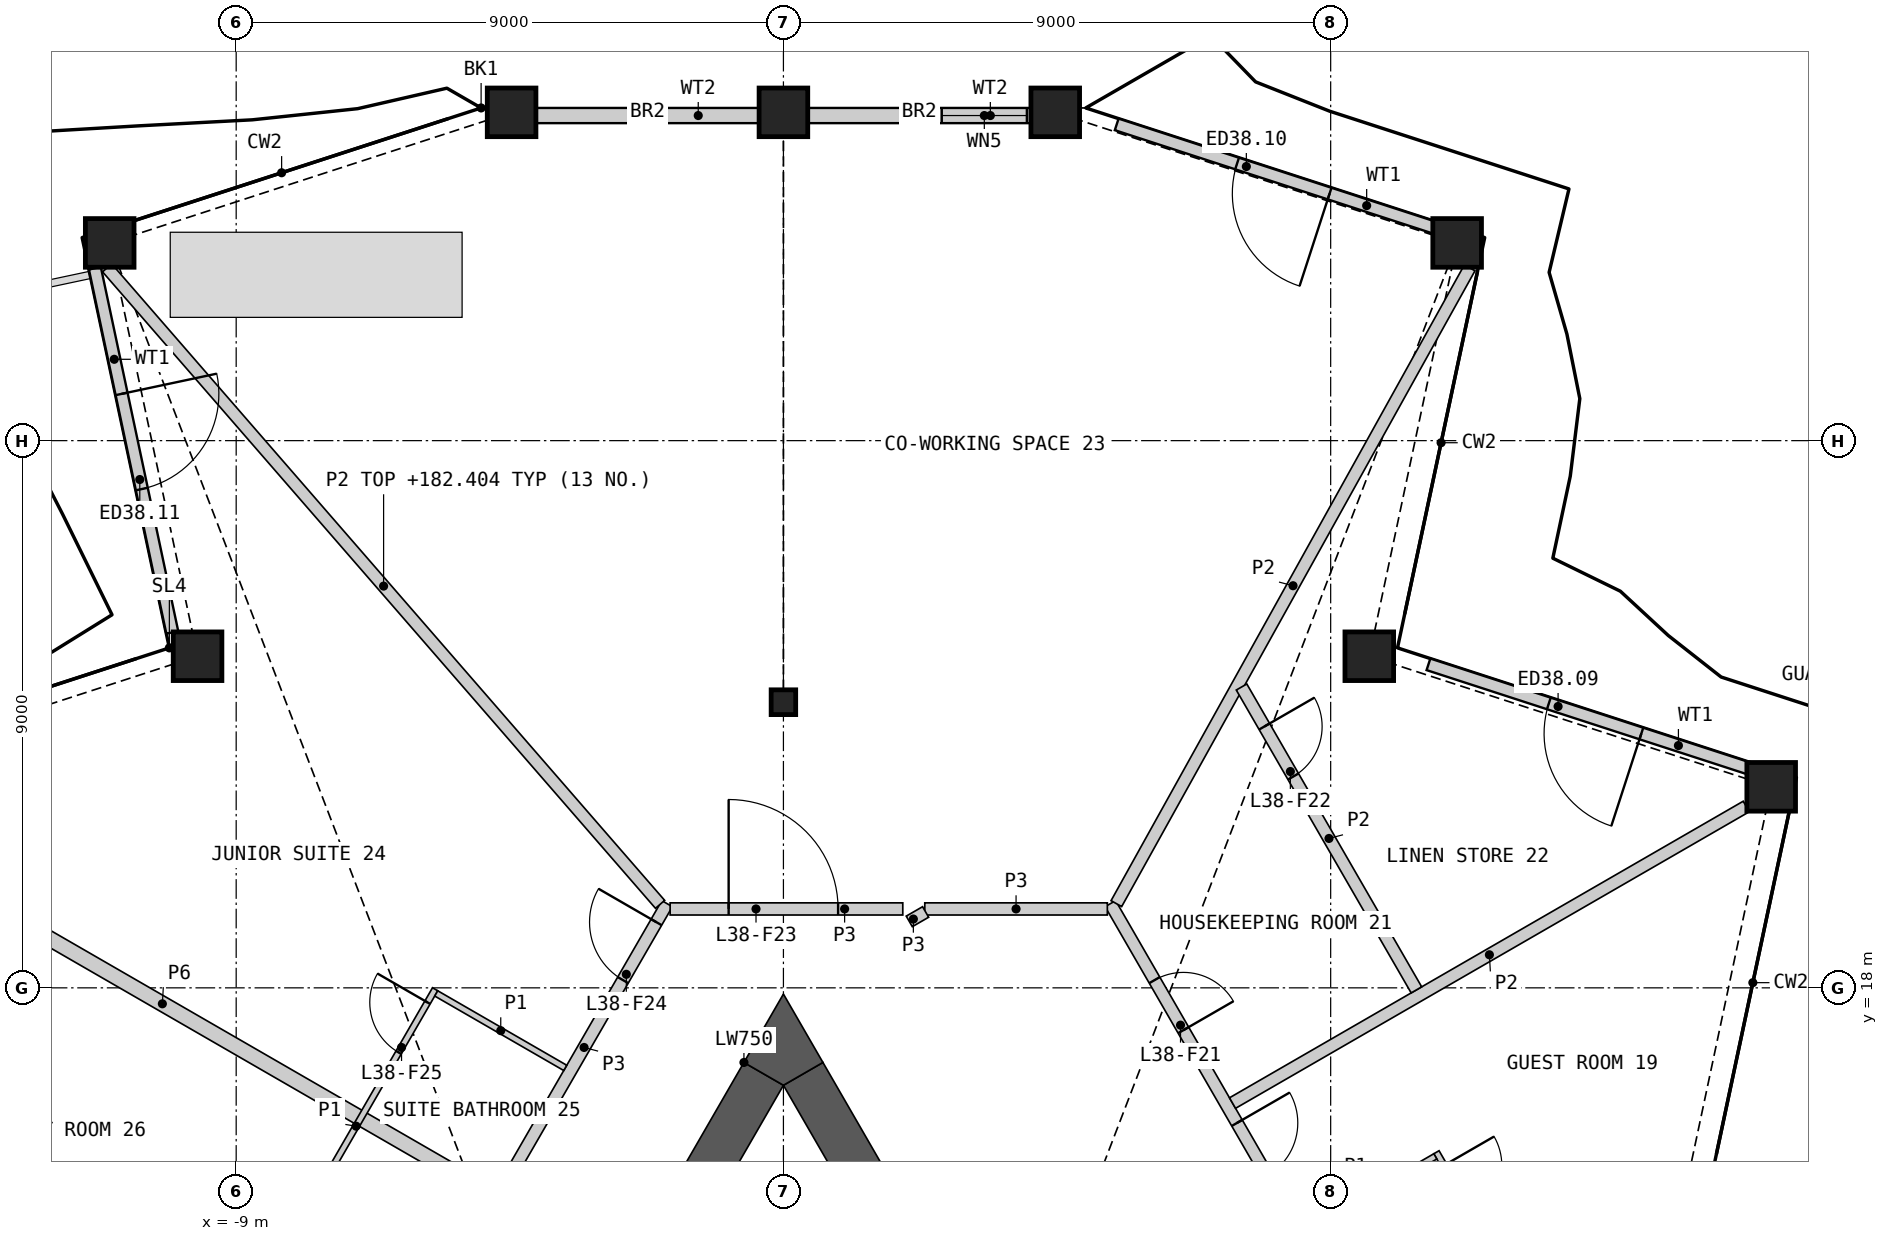
"""IFC4 building model, lengths in metres.
Left out: names, types, materials, properties, quantities, classifications, styles, units other than length and angle.
Written with IfcOpenShell. Run it as: python <this file> out.ifc"""

import sys

from ifc_helpers import new_model, si_unit, direction, frame, frame_2d, origin, origin_2d, place, context, subcontext, project, spatial, polyline, rectangle, hollow_rectangle, i_section, outline, extrude, element, fill, save


model = new_model("IFC4")
c1 = context("Model", 3, precision=1e-05, world=origin(), true_north=direction((0.0, 1.0)))
c2 = subcontext(c1, "Body", "Model", "MODEL_VIEW")
j1 = project(units=[si_unit("LENGTHUNIT", "METRE"), si_unit("PLANEANGLEUNIT", "RADIAN")], contexts=[c1])
p1 = place(None, origin())
s1 = spatial("IfcSite", under=j1, at=p1, CompositionType="ELEMENT")
p2 = place(p1, origin())
s2 = spatial("IfcBuilding", under=s1, at=p2, CompositionType="ELEMENT")
p3 = place(p2, frame((0.0, 0.0, 180.0)))
s3 = spatial("IfcBuildingStorey", under=s2, at=p3, CompositionType="ELEMENT", Elevation=180.0)
for number, where, z_axis, x_axis in (
    (1, (16.245, 21.306, 0.0), (0.0, 0.0, 1.0), (1.0, 0.0, 0.0)),
    (2, (9.635, 23.454, 0.0), (0.0, 0.0, 1.0), (1.0, 0.0, 0.0)),
    (3, (11.08, 30.252, 0.0), (0.0, 0.0, 1.0), (1.0, 0.0, 0.0)),
    (4, (4.47, 32.399, 0.0), (0.0, 0.0, 1.0), (1.0, 0.0, 0.0)),
    (5, (0.0, 32.399, 0.0), (0.0, 0.0, 1.0), (1.0, 0.0, 0.0)),
    (6, (-4.47, 32.399, 0.0), (0.0, 0.0, 1.0), (1.0, 0.0, 0.0)),
    (7, (-11.08, 30.252, 0.0), (0.0, 0.0, 1.0), (1.0, 0.0, 0.0)),
    (8, (-9.635, 23.454, 0.0), (0.0, 0.0, 1.0), (1.0, 0.0, 0.0)),
):
    element("IfcColumn", number, at=place(p3, frame(where, z_axis=z_axis, x_axis=x_axis)), inside=s3, PredefinedType="COLUMN", context=c2, shape_type="SweptSolid", body=[
        extrude(hollow_rectangle(XDim=0.8, YDim=0.8, WallThickness=0.05, at=origin_2d()), origin(), (0.0, 0.0, 1.0), 3.6),
    ])
p4 = place(p3, frame((0.0, 22.698, 0.0), z_axis=(0.0, 0.0, 1.0), x_axis=(1.0, 0.0, 0.0)))
e9 = element("IfcColumn", 9, at=p4, inside=s3, PredefinedType="COLUMN", context=c2, shape_type="SweptSolid", body=[
    extrude(i_section(OverallWidth=0.404, OverallDepth=0.407, WebThickness=0.027, FlangeThickness=0.044, at=origin_2d()), origin(), (0.0, 0.0, 1.0), 3.6),
])
p5 = place(p3, frame((16.089, 21.54, 0.0), z_axis=(0.0, 0.0, 1.0), x_axis=(-0.951053678976, 0.30902572661, 0.0)))
e10 = element("IfcWall", 10, at=p5, inside=s3, PredefinedType="SOLIDWALL", context=c2, shape_type="SweptSolid", body=[
    extrude(rectangle(XDim=5.763, YDim=0.2, at=frame_2d((2.882, 0.0))), origin(), (0.0, 0.0, 1.0), 2.701),
])
p6 = place(p5, frame((2.082, 0.0, 0.0)))
e11 = element("IfcOpeningElement", 11, at=p6, cuts=e10, PredefinedType="OPENING", context=c2, shape_type="SweptSolid", body=[
    extrude(rectangle(XDim=1.6, YDim=2.4, at=frame_2d((0.8, 1.2))), frame((0.0, 0.11, 0.0), z_axis=(0.0, -1.0, 0.0), x_axis=(1.0, 0.0, 0.0)), (0.0, 0.0, 1.0), 0.22),
])
p7 = place(p3, frame((10.962, 30.42, 0.0), z_axis=(0.0, 0.0, 1.0), x_axis=(-0.951062083689, 0.308999859173, 0.0)))
e12 = element("IfcWall", 12, at=p7, inside=s3, PredefinedType="SOLIDWALL", context=c2, shape_type="SweptSolid", body=[
    extrude(rectangle(XDim=5.763, YDim=0.2, at=frame_2d((2.881, 0.0))), origin(), (0.0, 0.0, 1.0), 2.701),
])
p8 = place(p7, frame((2.082, 0.0, 0.0)))
e13 = element("IfcOpeningElement", 13, at=p8, cuts=e12, PredefinedType="OPENING", context=c2, shape_type="SweptSolid", body=[
    extrude(rectangle(XDim=1.6, YDim=2.4, at=frame_2d((0.8, 1.2))), frame((0.0, 0.11, 0.0), z_axis=(0.0, -1.0, 0.0), x_axis=(1.0, 0.0, 0.0)), (0.0, 0.0, 1.0), 0.22),
])
p9 = place(p3, frame((4.404, 32.347, 0.0), z_axis=(0.0, 0.0, 1.0), x_axis=(-1.0, 0.0, 0.0)))
e14 = element("IfcWall", 14, at=p9, inside=s3, PredefinedType="SOLIDWALL", context=c2, shape_type="SweptSolid", body=[
    extrude(rectangle(XDim=4.004, YDim=0.25, at=frame_2d((2.002, 0.0))), origin(), (0.0, 0.0, 1.0), 2.701),
])
p10 = place(p9, frame((0.4, 0.0, 1.6)))
e15 = element("IfcOpeningElement", 15, at=p10, cuts=e14, PredefinedType="OPENING", context=c2, shape_type="SweptSolid", body=[
    extrude(rectangle(XDim=1.4, YDim=0.9, at=frame_2d((0.7, 0.45))), frame((0.0, 0.135, 0.0), z_axis=(0.0, -1.0, 0.0), x_axis=(1.0, 0.0, 0.0)), (0.0, 0.0, 1.0), 0.27),
])
p11 = place(p3, frame((-0.4, 32.347, 0.0), z_axis=(0.0, 0.0, 1.0), x_axis=(-1.0, 0.0, 0.0)))
e16 = element("IfcWall", 16, at=p11, inside=s3, PredefinedType="SOLIDWALL", context=c2, shape_type="SweptSolid", body=[
    extrude(rectangle(XDim=4.004, YDim=0.25, at=frame_2d((2.002, 0.0))), origin(), (0.0, 0.0, 1.0), 2.701),
])
p12 = place(p3, frame((-11.324, 29.835, 0.0), z_axis=(0.0, 0.0, 1.0), x_axis=(0.207925037413, -0.978144763732, 0.0)))
e17 = element("IfcWall", 17, at=p12, inside=s3, PredefinedType="SOLIDWALL", context=c2, shape_type="SweptSolid", body=[
    extrude(rectangle(XDim=6.123, YDim=0.2, at=frame_2d((3.062, 0.0))), origin(), (0.0, 0.0, 1.0), 2.701),
])
p13 = place(p12, frame((2.113, 0.0, 0.0)))
e18 = element("IfcOpeningElement", 18, at=p13, cuts=e17, PredefinedType="OPENING", context=c2, shape_type="SweptSolid", body=[
    extrude(rectangle(XDim=1.6, YDim=2.4, at=frame_2d((0.8, 1.2))), frame((0.0, 0.11, 0.0), z_axis=(0.0, -1.0, 0.0), x_axis=(1.0, 0.0, 0.0)), (0.0, 0.0, 1.0), 0.22),
])
p14 = place(p3, frame((3.661, 10.806, 0.0), z_axis=(0.0, 0.0, 1.0), x_axis=(-0.500014865866, 0.866016820803, 0.0)))
e19 = element("IfcWall", 19, at=p14, inside=s3, PredefinedType="SHEAR", context=c2, shape_type="SweptSolid", body=[
    extrude(rectangle(XDim=6.673, YDim=0.75, at=frame_2d((3.336, 0.0))), origin(), (0.0, 0.0, 1.0), 3.25),
])
p15 = place(p3, frame((-0.325, 16.585, 0.0), z_axis=(0.0, 0.0, 1.0), x_axis=(-0.500019473932, -0.866014160212, 0.0)))
e20 = element("IfcWall", 20, at=p15, inside=s3, PredefinedType="SHEAR", context=c2, shape_type="SweptSolid", body=[
    extrude(rectangle(XDim=2.396, YDim=0.75, at=frame_2d((1.198, 0.0))), origin(), (0.0, 0.0, 1.0), 3.25),
])
p16 = place(p3, origin())
e21 = element("IfcWall", 21, at=p16, inside=s3, PredefinedType="SHEAR", context=c2, shape_type="SweptSolid", body=[
    extrude(outline(polyline([(-0.649, 16.773), (0.0, 17.898), (0.649, 16.773), (0.0, 16.398), (-0.649, 16.773)])), origin(), (0.0, 0.0, 1.0), 3.25),
])
p17 = place(p3, frame((5.377, 19.385, 0.0), z_axis=(0.0, 0.0, 1.0), x_axis=(0.500000757641, -0.86602496636, 0.0)))
e22 = element("IfcWall", 22, at=p17, inside=s3, PredefinedType="PARTITIONING", context=c2, shape_type="SweptSolid", body=[
    extrude(rectangle(XDim=28.198, YDim=0.2, at=frame_2d((14.099, 0.0))), origin(), (0.0, 0.0, 1.0), 3.25),
])
p18 = place(p17, frame((22.735, 0.0, 0.0)))
e23 = element("IfcOpeningElement", 23, at=p18, cuts=e22, PredefinedType="OPENING", context=c2, shape_type="SweptSolid", body=[
    extrude(rectangle(XDim=1.8, YDim=2.1, at=frame_2d((0.9, 1.05))), frame((0.0, 0.11, 0.0), z_axis=(0.0, -1.0, 0.0), x_axis=(1.0, 0.0, 0.0)), (0.0, 0.0, 1.0), 0.22),
])
p19 = place(p17, frame((14.402, 0.0, 0.0)))
e24 = element("IfcOpeningElement", 24, at=p19, cuts=e22, PredefinedType="OPENING", context=c2, shape_type="SweptSolid", body=[
    extrude(rectangle(XDim=1.0, YDim=2.1, at=frame_2d((0.5, 1.05))), frame((0.0, 0.11, 0.0), z_axis=(0.0, -1.0, 0.0), x_axis=(1.0, 0.0, 0.0)), (0.0, 0.0, 1.0), 0.22),
])
p20 = place(p17, frame((12.796, 0.0, 0.0)))
e25 = element("IfcOpeningElement", 25, at=p20, cuts=e22, PredefinedType="OPENING", context=c2, shape_type="SweptSolid", body=[
    extrude(rectangle(XDim=1.0, YDim=2.1, at=frame_2d((0.5, 1.05))), frame((0.0, 0.11, 0.0), z_axis=(0.0, -1.0, 0.0), x_axis=(1.0, 0.0, 0.0)), (0.0, 0.0, 1.0), 0.22),
])
p21 = place(p17, frame((4.164, 0.0, 0.0)))
e26 = element("IfcOpeningElement", 26, at=p21, cuts=e22, PredefinedType="OPENING", context=c2, shape_type="SweptSolid", body=[
    extrude(rectangle(XDim=1.0, YDim=2.1, at=frame_2d((0.5, 1.05))), frame((0.0, 0.11, 0.0), z_axis=(0.0, -1.0, 0.0), x_axis=(1.0, 0.0, 0.0)), (0.0, 0.0, 1.0), 0.22),
])
p22 = place(p17, frame((1.452, 0.0, 0.0)))
e27 = element("IfcOpeningElement", 27, at=p22, cuts=e22, PredefinedType="OPENING", context=c2, shape_type="SweptSolid", body=[
    extrude(rectangle(XDim=0.95, YDim=2.1, at=frame_2d((0.475, 1.05))), frame((0.0, 0.11, 0.0), z_axis=(0.0, -1.0, 0.0), x_axis=(1.0, 0.0, 0.0)), (0.0, 0.0, 1.0), 0.22),
])
p23 = place(p3, frame((-15.835, 20.983, 0.0), z_axis=(0.0, 0.0, 1.0), x_axis=(0.866022720283, -0.500004647933, 0.0)))
e28 = element("IfcWall", 28, at=p23, inside=s3, PredefinedType="PARTITIONING", context=c2, shape_type="SweptSolid", body=[
    extrude(rectangle(XDim=12.981, YDim=0.25, at=frame_2d((6.49, 0.0))), origin(), (0.0, 0.0, 1.0), 2.404),
])
p24 = place(p3, frame((-4.644, 14.655, 0.0), z_axis=(0.0, 0.0, 1.0), x_axis=(0.49998041698, 0.866036709751, 0.0)))
e29 = element("IfcWall", 29, at=p24, inside=s3, PredefinedType="PARTITIONING", context=c2, shape_type="SweptSolid", body=[
    extrude(rectangle(XDim=5.462, YDim=0.2, at=frame_2d((2.731, 0.0))), origin(), (0.0, 0.0, 1.0), 3.25),
])
p25 = place(p24, frame((4.01, 0.0, 0.0)))
e30 = element("IfcOpeningElement", 30, at=p25, cuts=e29, PredefinedType="OPENING", context=c2, shape_type="SweptSolid", body=[
    extrude(rectangle(XDim=1.1, YDim=2.1, at=frame_2d((0.55, 1.05))), frame((0.0, 0.11, 0.0), z_axis=(0.0, -1.0, 0.0), x_axis=(1.0, 0.0, 0.0)), (0.0, 0.0, 1.0), 0.22),
])
p26 = place(p3, frame((-1.863, 19.298, 0.0), z_axis=(0.0, 0.0, 1.0), x_axis=(1.0, 0.0, 0.0)))
e31 = element("IfcWall", 31, at=p26, inside=s3, PredefinedType="PARTITIONING", context=c2, shape_type="SweptSolid", body=[
    extrude(rectangle(XDim=3.826, YDim=0.2, at=frame_2d((1.913, 0.0))), origin(), (0.0, 0.0, 1.0), 3.25),
])
p27 = place(p26, frame((0.962, 0.0, 0.0)))
e32 = element("IfcOpeningElement", 32, at=p27, cuts=e31, PredefinedType="OPENING", context=c2, shape_type="SweptSolid", body=[
    extrude(rectangle(XDim=1.8, YDim=2.1, at=frame_2d((0.9, 1.05))), frame((0.0, 0.11, 0.0), z_axis=(0.0, -1.0, 0.0), x_axis=(1.0, 0.0, 0.0)), (0.0, 0.0, 1.0), 0.22),
])
p28 = place(p3, frame((2.325, 19.298, 0.0), z_axis=(0.0, 0.0, 1.0), x_axis=(1.0, 0.0, 0.0)))
e33 = element("IfcWall", 33, at=p28, inside=s3, PredefinedType="PARTITIONING", context=c2, shape_type="SweptSolid", body=[
    extrude(rectangle(XDim=3.002, YDim=0.2, at=frame_2d((1.501, 0.0))), origin(), (0.0, 0.0, 1.0), 3.25),
])
p29 = place(p3, frame((2.07, 19.093, 0.0), z_axis=(0.0, 0.0, 1.0), x_axis=(0.866395311824, 0.499358752451, 0.0)))
e34 = element("IfcWall", 34, at=p29, inside=s3, PredefinedType="PARTITIONING", context=c2, shape_type="SweptSolid", body=[
    extrude(rectangle(XDim=0.31, YDim=0.2, at=frame_2d((0.155, 0.0))), origin(), (0.0, 0.0, 1.0), 3.25),
])
p30 = place(p3, frame((-11.122, 29.842, 0.0), z_axis=(0.0, 0.0, 1.0), x_axis=(0.65579678992, -0.754937461205, 0.0)))
e35 = element("IfcWall", 35, at=p30, inside=s3, PredefinedType="PARTITIONING", context=c2, shape_type="SweptSolid", body=[
    extrude(rectangle(XDim=13.867, YDim=0.2, at=frame_2d((6.933, 0.0))), origin(), (0.0, 0.0, 1.0), 2.404),
])
p31 = place(p3, frame((5.476, 19.385, 0.0), z_axis=(0.0, 0.0, 1.0), x_axis=(0.485729569949, 0.874109137853, 0.0)))
e36 = element("IfcWall", 36, at=p31, inside=s3, PredefinedType="PARTITIONING", context=c2, shape_type="SweptSolid", body=[
    extrude(rectangle(XDim=11.962, YDim=0.2, at=frame_2d((5.981, 0.0))), origin(), (0.0, 0.0, 1.0), 2.404),
])
p32 = place(p3, frame((7.386, 16.105, 0.0), z_axis=(0.0, 0.0, 1.0), x_axis=(0.866023056814, 0.500004065051, 0.0)))
e37 = element("IfcWall", 37, at=p32, inside=s3, PredefinedType="PARTITIONING", context=c2, shape_type="SweptSolid", body=[
    extrude(rectangle(XDim=9.756, YDim=0.2, at=frame_2d((4.878, 0.0))), origin(), (0.0, 0.0, 1.0), 2.404),
])
p33 = place(p3, frame((7.534, 22.948, 0.0), z_axis=(0.0, 0.0, 1.0), x_axis=(0.499991885958, -0.866030088378, 0.0)))
e38 = element("IfcWall", 38, at=p33, inside=s3, PredefinedType="PARTITIONING", context=c2, shape_type="SweptSolid", body=[
    extrude(rectangle(XDim=5.752, YDim=0.2, at=frame_2d((2.876, 0.0))), origin(), (0.0, 0.0, 1.0), 2.404),
])
p34 = place(p33, frame((0.75, 0.0, 0.0)))
e39 = element("IfcOpeningElement", 39, at=p34, cuts=e38, PredefinedType="OPENING", context=c2, shape_type="SweptSolid", body=[
    extrude(rectangle(XDim=0.95, YDim=2.1, at=frame_2d((0.475, 1.05))), frame((0.0, 0.11, 0.0), z_axis=(0.0, -1.0, 0.0), x_axis=(1.0, 0.0, 0.0)), (0.0, 0.0, 1.0), 0.22),
])
p35 = place(p3, frame((10.74, 15.296, 0.0), z_axis=(0.0, 0.0, 1.0), x_axis=(0.500015767406, -0.866016300277, 0.0)))
e40 = element("IfcWall", 40, at=p35, inside=s3, PredefinedType="PARTITIONING", context=c2, shape_type="SweptSolid", body=[
    extrude(rectangle(XDim=5.5, YDim=0.1, at=frame_2d((2.75, 0.0))), origin(), (0.0, 0.0, 1.0), 2.404),
])
p36 = place(p35, frame((4.3, 0.0, 0.0)))
e41 = element("IfcOpeningElement", 41, at=p36, cuts=e40, PredefinedType="OPENING", context=c2, shape_type="SweptSolid", body=[
    extrude(rectangle(XDim=0.95, YDim=2.1, at=frame_2d((0.475, 1.05))), frame((0.0, 0.06, 0.0), z_axis=(0.0, -1.0, 0.0), x_axis=(1.0, 0.0, 0.0)), (0.0, 0.0, 1.0), 0.12),
])
p37 = place(p35, frame((0.25, 0.0, 0.0)))
e42 = element("IfcOpeningElement", 42, at=p37, cuts=e40, PredefinedType="OPENING", context=c2, shape_type="SweptSolid", body=[
    extrude(rectangle(XDim=0.95, YDim=2.1, at=frame_2d((0.475, 1.05))), frame((0.0, 0.06, 0.0), z_axis=(0.0, -1.0, 0.0), x_axis=(1.0, 0.0, 0.0)), (0.0, 0.0, 1.0), 0.12),
])
p38 = place(p3, frame((-8.328, 13.473, 0.0), z_axis=(0.0, 0.0, 1.0), x_axis=(0.499992051641, 0.866029992723, 0.0)))
e43 = element("IfcWall", 43, at=p38, inside=s3, PredefinedType="PARTITIONING", context=c2, shape_type="SweptSolid", body=[
    extrude(rectangle(XDim=5.2, YDim=0.1, at=frame_2d((2.6, 0.0))), origin(), (0.0, 0.0, 1.0), 2.404),
])
p39 = place(p38, frame((4.0, 0.0, 0.0)))
e44 = element("IfcOpeningElement", 44, at=p39, cuts=e43, PredefinedType="OPENING", context=c2, shape_type="SweptSolid", body=[
    extrude(rectangle(XDim=0.95, YDim=2.1, at=frame_2d((0.475, 1.05))), frame((0.0, 0.06, 0.0), z_axis=(0.0, -1.0, 0.0), x_axis=(1.0, 0.0, 0.0)), (0.0, 0.0, 1.0), 0.12),
])
p40 = place(p38, frame((0.25, 0.0, 0.0)))
e45 = element("IfcOpeningElement", 45, at=p40, cuts=e43, PredefinedType="OPENING", context=c2, shape_type="SweptSolid", body=[
    extrude(rectangle(XDim=0.95, YDim=2.1, at=frame_2d((0.475, 1.05))), frame((0.0, 0.06, 0.0), z_axis=(0.0, -1.0, 0.0), x_axis=(1.0, 0.0, 0.0)), (0.0, 0.0, 1.0), 0.12),
])
p41 = place(p3, frame((-5.71, 17.908, 0.0), z_axis=(0.0, 0.0, 1.0), x_axis=(0.866057815567, -0.499943856944, 0.0)))
e46 = element("IfcWall", 46, at=p41, inside=s3, PredefinedType="PARTITIONING", context=c2, shape_type="SweptSolid", body=[
    extrude(rectangle(XDim=2.45, YDim=0.1, at=frame_2d((1.225, 0.0))), origin(), (0.0, 0.0, 1.0), 2.404),
])
p42 = place(p3, frame((8.6, 14.003, 0.0), z_axis=(0.0, 0.0, 1.0), x_axis=(0.866032905446, 0.499987006516, 0.0)))
e47 = element("IfcWall", 47, at=p42, inside=s3, PredefinedType="PARTITIONING", context=c2, shape_type="SweptSolid", body=[
    extrude(rectangle(XDim=2.45, YDim=0.1, at=frame_2d((1.225, 0.0))), origin(), (0.0, 0.0, 1.0), 2.404),
])
p43 = place(p6, origin())
e48 = element("IfcDoor", 48, at=p43, inside=s3, OperationType="DOUBLE_DOOR_SINGLE_SWING", PredefinedType="DOOR", context=c2, shape_type="SweptSolid", body=[
    extrude(rectangle(XDim=1.6, YDim=2.4, at=frame_2d((0.8, 1.2))), frame((0.0, 0.025, 0.0), z_axis=(0.0, -1.0, 0.0), x_axis=(1.0, 0.0, 0.0)), (0.0, 0.0, 1.0), 0.05),
])
fill(e11, e48)
p44 = place(p8, origin())
e49 = element("IfcDoor", 49, at=p44, inside=s3, OperationType="DOUBLE_DOOR_SINGLE_SWING", PredefinedType="DOOR", context=c2, shape_type="SweptSolid", body=[
    extrude(rectangle(XDim=1.6, YDim=2.4, at=frame_2d((0.8, 1.2))), frame((0.0, 0.025, 0.0), z_axis=(0.0, -1.0, 0.0), x_axis=(1.0, 0.0, 0.0)), (0.0, 0.0, 1.0), 0.05),
])
fill(e13, e49)
p45 = place(p10, origin())
e50 = element("IfcWindow", 50, at=p45, inside=s3, PartitioningType="SINGLE_PANEL", PredefinedType="WINDOW", context=c2, shape_type="SweptSolid", body=[
    extrude(rectangle(XDim=1.4, YDim=0.9, at=frame_2d((0.7, 0.45))), frame((0.0, 0.03, 0.0), z_axis=(0.0, -1.0, 0.0), x_axis=(1.0, 0.0, 0.0)), (0.0, 0.0, 1.0), 0.06),
])
fill(e15, e50)
p46 = place(p13, origin())
e51 = element("IfcDoor", 51, at=p46, inside=s3, OperationType="DOUBLE_DOOR_SINGLE_SWING", PredefinedType="DOOR", context=c2, shape_type="SweptSolid", body=[
    extrude(rectangle(XDim=1.6, YDim=2.4, at=frame_2d((0.8, 1.2))), frame((0.0, 0.025, 0.0), z_axis=(0.0, -1.0, 0.0), x_axis=(1.0, 0.0, 0.0)), (0.0, 0.0, 1.0), 0.05),
])
fill(e18, e51)
p47 = place(p21, origin())
e52 = element("IfcDoor", 52, at=p47, inside=s3, OperationType="SINGLE_SWING_LEFT", PredefinedType="DOOR", context=c2, shape_type="SweptSolid", body=[
    extrude(rectangle(XDim=1.0, YDim=2.1, at=frame_2d((0.5, 1.05))), frame((0.0, 0.025, 0.0), z_axis=(0.0, -1.0, 0.0), x_axis=(1.0, 0.0, 0.0)), (0.0, 0.0, 1.0), 0.05),
])
fill(e26, e52)
p48 = place(p22, origin())
e53 = element("IfcDoor", 53, at=p48, inside=s3, OperationType="SINGLE_SWING_RIGHT", PredefinedType="DOOR", context=c2, shape_type="SweptSolid", body=[
    extrude(rectangle(XDim=0.95, YDim=2.1, at=frame_2d((0.475, 1.05))), frame((0.0, 0.025, 0.0), z_axis=(0.0, -1.0, 0.0), x_axis=(1.0, 0.0, 0.0)), (0.0, 0.0, 1.0), 0.05),
])
fill(e27, e53)
p49 = place(p34, origin())
e54 = element("IfcDoor", 54, at=p49, inside=s3, OperationType="SINGLE_SWING_LEFT", PredefinedType="DOOR", context=c2, shape_type="SweptSolid", body=[
    extrude(rectangle(XDim=0.95, YDim=2.1, at=frame_2d((0.475, 1.05))), frame((0.0, 0.025, 0.0), z_axis=(0.0, -1.0, 0.0), x_axis=(1.0, 0.0, 0.0)), (0.0, 0.0, 1.0), 0.05),
])
fill(e39, e54)
p50 = place(p27, origin())
e55 = element("IfcDoor", 55, at=p50, inside=s3, OperationType="DOUBLE_DOOR_SINGLE_SWING", PredefinedType="DOOR", context=c2, shape_type="SweptSolid", body=[
    extrude(rectangle(XDim=1.8, YDim=2.1, at=frame_2d((0.9, 1.05))), frame((0.0, 0.025, 0.0), z_axis=(0.0, -1.0, 0.0), x_axis=(1.0, 0.0, 0.0)), (0.0, 0.0, 1.0), 0.05),
])
fill(e32, e55)
p51 = place(p25, origin())
e56 = element("IfcDoor", 56, at=p51, inside=s3, OperationType="SINGLE_SWING_RIGHT", PredefinedType="DOOR", context=c2, shape_type="SweptSolid", body=[
    extrude(rectangle(XDim=1.1, YDim=2.1, at=frame_2d((0.55, 1.05))), frame((0.0, 0.025, 0.0), z_axis=(0.0, -1.0, 0.0), x_axis=(1.0, 0.0, 0.0)), (0.0, 0.0, 1.0), 0.05),
])
fill(e30, e56)
p52 = place(p39, origin())
e57 = element("IfcDoor", 57, at=p52, inside=s3, OperationType="SINGLE_SWING_RIGHT", PredefinedType="DOOR", context=c2, shape_type="SweptSolid", body=[
    extrude(rectangle(XDim=0.95, YDim=2.1, at=frame_2d((0.475, 1.05))), frame((0.0, 0.025, 0.0), z_axis=(0.0, -1.0, 0.0), x_axis=(1.0, 0.0, 0.0)), (0.0, 0.0, 1.0), 0.05),
])
fill(e44, e57)
save(model, sys.argv[1])
